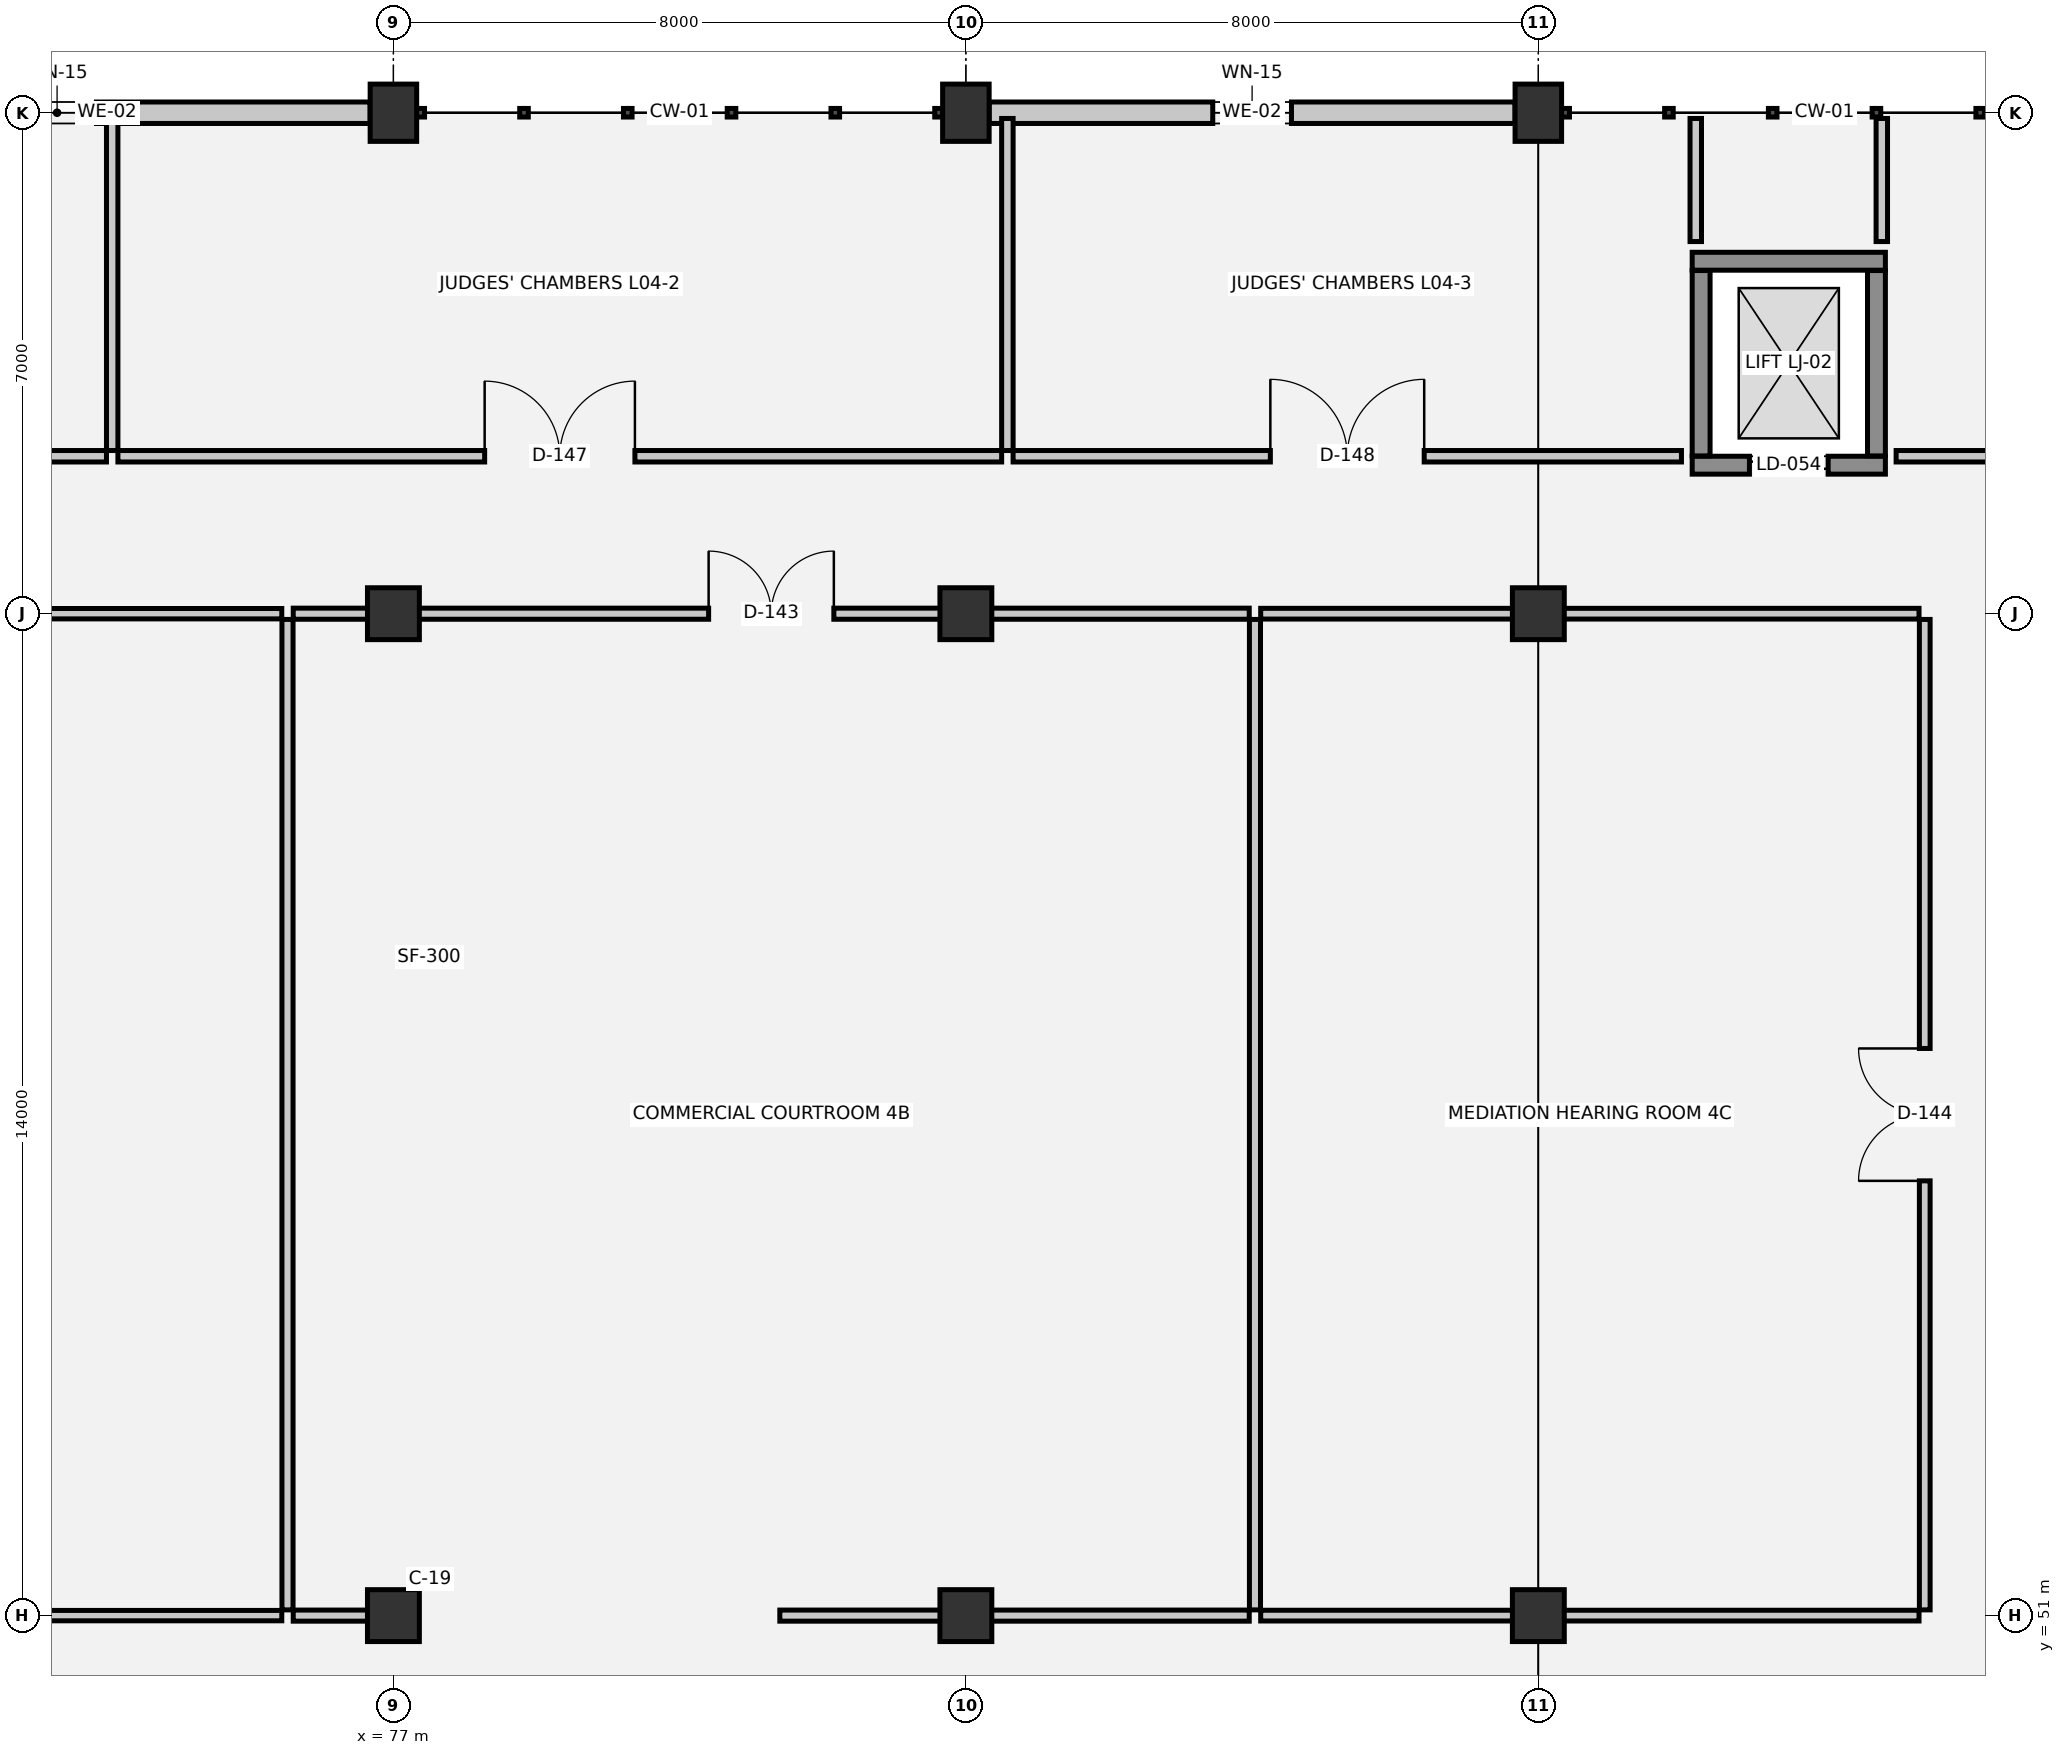
"""IFC4 building model, lengths in metres.
Left out: names, types, materials, properties, quantities, classifications, styles, units other than length and angle.
Written with IfcOpenShell. Run it as: python <this file> out.ifc"""

import sys

from ifc_helpers import new_model, si_unit, direction, frame, frame_2d, origin, origin_2d, place, context, subcontext, project, spatial, rectangle, extrude, element, fill, save


model = new_model("IFC4")
c1 = context("Model", 3, precision=1e-05, world=origin(), true_north=direction((0.0, 1.0)))
c2 = subcontext(c1, "Body", "Model", "MODEL_VIEW")
j1 = project(units=[si_unit("LENGTHUNIT", "METRE"), si_unit("PLANEANGLEUNIT", "RADIAN")], contexts=[c1])
p1 = place(None, origin())
s1 = spatial("IfcSite", under=j1, at=p1, CompositionType="ELEMENT")
p2 = place(p1, origin())
s2 = spatial("IfcBuilding", under=s1, at=p2, CompositionType="ELEMENT")
p3 = place(p2, frame((0.0, 0.0, 14.4)))
s3 = spatial("IfcBuildingStorey", under=s2, at=p3, CompositionType="ELEMENT", Elevation=14.4)
for number, where, z_axis, x_axis in (
    (1, (77.0, 51.0, 0.0), (0.0, 0.0, 1.0), (1.0, 0.0, 0.0)),
    (2, (77.0, 65.0, 0.0), (0.0, 0.0, 1.0), (1.0, 0.0, 0.0)),
):
    element("IfcColumn", number, at=place(p3, frame(where, z_axis=z_axis, x_axis=x_axis)), inside=s3, PredefinedType="COLUMN", context=c2, shape_type="SweptSolid", body=[
        extrude(rectangle(XDim=0.725, YDim=0.725, at=origin_2d()), origin(), (0.0, 0.0, 1.0), 3.9),
    ])
p4 = place(p3, frame((77.0, 72.0, 0.0), z_axis=(0.0, 0.0, 1.0), x_axis=(1.0, 0.0, 0.0)))
e3 = element("IfcColumn", 3, at=p4, inside=s3, PredefinedType="COLUMN", context=c2, shape_type="SweptSolid", body=[
    extrude(rectangle(XDim=0.65, YDim=0.8, at=origin_2d()), origin(), (0.0, 0.0, 1.0), 3.9),
])
for number, where, z_axis, x_axis in (
    (4, (85.0, 51.0, 0.0), (0.0, 0.0, 1.0), (1.0, 0.0, 0.0)),
    (5, (85.0, 65.0, 0.0), (0.0, 0.0, 1.0), (1.0, 0.0, 0.0)),
):
    element("IfcColumn", number, at=place(p3, frame(where, z_axis=z_axis, x_axis=x_axis)), inside=s3, PredefinedType="COLUMN", context=c2, shape_type="SweptSolid", body=[
        extrude(rectangle(XDim=0.725, YDim=0.725, at=origin_2d()), origin(), (0.0, 0.0, 1.0), 3.9),
    ])
p5 = place(p3, frame((85.0, 72.0, 0.0), z_axis=(0.0, 0.0, 1.0), x_axis=(1.0, 0.0, 0.0)))
e6 = element("IfcColumn", 6, at=p5, inside=s3, PredefinedType="COLUMN", context=c2, shape_type="SweptSolid", body=[
    extrude(rectangle(XDim=0.65, YDim=0.8, at=origin_2d()), origin(), (0.0, 0.0, 1.0), 3.9),
])
for number, where, z_axis, x_axis in (
    (7, (93.0, 51.0, 0.0), (0.0, 0.0, 1.0), (1.0, 0.0, 0.0)),
    (8, (93.0, 65.0, 0.0), (0.0, 0.0, 1.0), (1.0, 0.0, 0.0)),
):
    element("IfcColumn", number, at=place(p3, frame(where, z_axis=z_axis, x_axis=x_axis)), inside=s3, PredefinedType="COLUMN", context=c2, shape_type="SweptSolid", body=[
        extrude(rectangle(XDim=0.725, YDim=0.725, at=origin_2d()), origin(), (0.0, 0.0, 1.0), 3.9),
    ])
p6 = place(p3, frame((93.0, 72.0, 0.0), z_axis=(0.0, 0.0, 1.0), x_axis=(1.0, 0.0, 0.0)))
e9 = element("IfcColumn", 9, at=p6, inside=s3, PredefinedType="COLUMN", context=c2, shape_type="SweptSolid", body=[
    extrude(rectangle(XDim=0.65, YDim=0.8, at=origin_2d()), origin(), (0.0, 0.0, 1.0), 3.9),
])
p7 = place(p3, frame((69.325, 72.0, 0.0), z_axis=(0.0, 0.0, 1.0), x_axis=(1.0, 0.0, 0.0)))
e10 = element("IfcWall", 10, at=p7, inside=s3, PredefinedType="SOLIDWALL", context=c2, shape_type="SweptSolid", body=[
    extrude(rectangle(XDim=7.35, YDim=0.3, at=frame_2d((3.675, 0.0))), origin(), (0.0, 0.0, 1.0), 2.61),
])
p8 = place(p7, frame((2.425, 0.0, 1.0)))
e11 = element("IfcOpeningElement", 11, at=p8, cuts=e10, PredefinedType="OPENING", context=c2, shape_type="SweptSolid", body=[
    extrude(rectangle(XDim=1.1, YDim=1.2, at=frame_2d((0.55, 0.6))), frame((0.0, 0.16, 0.0), z_axis=(0.0, -1.0, 0.0), x_axis=(1.0, 0.0, 0.0)), (0.0, 0.0, 1.0), 0.32),
])
p9 = place(p3, frame((85.325, 72.0, 0.0), z_axis=(0.0, 0.0, 1.0), x_axis=(1.0, 0.0, 0.0)))
e12 = element("IfcWall", 12, at=p9, inside=s3, PredefinedType="SOLIDWALL", context=c2, shape_type="SweptSolid", body=[
    extrude(rectangle(XDim=7.35, YDim=0.3, at=frame_2d((3.675, 0.0))), origin(), (0.0, 0.0, 1.0), 2.61),
])
p10 = place(p9, frame((3.125, 0.0, 1.0)))
e13 = element("IfcOpeningElement", 13, at=p10, cuts=e12, PredefinedType="OPENING", context=c2, shape_type="SweptSolid", body=[
    extrude(rectangle(XDim=1.1, YDim=1.2, at=frame_2d((0.55, 0.6))), frame((0.0, 0.16, 0.0), z_axis=(0.0, -1.0, 0.0), x_axis=(1.0, 0.0, 0.0)), (0.0, 0.0, 1.0), 0.32),
])
p11 = place(p3, frame((95.15, 67.075, 0.0), z_axis=(0.0, 0.0, 1.0), x_axis=(1.0, 0.0, 0.0)))
e14 = element("IfcWall", 14, at=p11, inside=s3, PredefinedType="SHEAR", context=c2, shape_type="SweptSolid", body=[
    extrude(rectangle(XDim=2.7, YDim=0.25, at=frame_2d((1.35, 0.0))), origin(), (0.0, 0.0, 1.0), 3.9),
])
p12 = place(p11, frame((0.8, 0.0, 0.0)))
e15 = element("IfcOpeningElement", 15, at=p12, cuts=e14, PredefinedType="OPENING", context=c2, shape_type="SweptSolid", body=[
    extrude(rectangle(XDim=1.1, YDim=2.15, at=frame_2d((0.55, 1.075))), frame((0.0, 0.135, 0.0), z_axis=(0.0, -1.0, 0.0), x_axis=(1.0, 0.0, 0.0)), (0.0, 0.0, 1.0), 0.27),
])
p13 = place(p3, frame((97.85, 69.925, 0.0), z_axis=(0.0, 0.0, 1.0), x_axis=(-1.0, 0.0, 0.0)))
e16 = element("IfcWall", 16, at=p13, inside=s3, PredefinedType="SHEAR", context=c2, shape_type="SweptSolid", body=[
    extrude(rectangle(XDim=2.7, YDim=0.25, at=frame_2d((1.35, 0.0))), origin(), (0.0, 0.0, 1.0), 3.9),
])
for number, where, z_axis, x_axis in (
    (17, (95.275, 69.795, 0.0), (0.0, 0.0, 1.0), (0.0, -1.0, 0.0)),
    (18, (97.725, 67.205, 0.0), (0.0, 0.0, 1.0), (0.0, 1.0, 0.0)),
):
    element("IfcWall", number, at=place(p3, frame(where, z_axis=z_axis, x_axis=x_axis)), inside=s3, PredefinedType="SHEAR", context=c2, shape_type="SweptSolid", body=[
        extrude(rectangle(XDim=2.59, YDim=0.25, at=frame_2d((1.295, 0.0))), origin(), (0.0, 0.0, 1.0), 3.9),
    ])
p14 = place(p3, frame((62.08, 51.0, 0.0), z_axis=(0.0, 0.0, 1.0), x_axis=(1.0, 0.0, 0.0)))
e19 = element("IfcWall", 19, at=p14, inside=s3, PredefinedType="PARTITIONING", context=c2, shape_type="SweptSolid", body=[
    extrude(rectangle(XDim=13.36, YDim=0.145, at=frame_2d((6.68, 0.0))), origin(), (0.0, 0.0, 1.0), 2.93),
])
p15 = place(p14, frame((4.186, 0.0, 0.0)))
e20 = element("IfcOpeningElement", 20, at=p15, cuts=e19, PredefinedType="OPENING", context=c2, shape_type="SweptSolid", body=[
    extrude(rectangle(XDim=1.7, YDim=2.3, at=frame_2d((0.85, 1.15))), frame((0.0, 0.083, 0.0), z_axis=(0.0, -1.0, 0.0), x_axis=(1.0, 0.0, 0.0)), (0.0, 0.0, 1.0), 0.165),
])
p16 = place(p3, frame((75.6, 51.0, 0.0), z_axis=(0.0, 0.0, 1.0), x_axis=(1.0, 0.0, 0.0)))
e21 = element("IfcWall", 21, at=p16, inside=s3, PredefinedType="PARTITIONING", context=c2, shape_type="SweptSolid", body=[
    extrude(rectangle(XDim=1.6, YDim=0.155, at=frame_2d((0.8, 0.0))), origin(), (0.0, 0.0, 1.0), 2.93),
])
p17 = place(p3, frame((82.4, 51.0, 0.0), z_axis=(0.0, 0.0, 1.0), x_axis=(1.0, 0.0, 0.0)))
e22 = element("IfcWall", 22, at=p17, inside=s3, PredefinedType="PARTITIONING", context=c2, shape_type="SweptSolid", body=[
    extrude(rectangle(XDim=6.56, YDim=0.155, at=frame_2d((3.28, 0.0))), origin(), (0.0, 0.0, 1.0), 2.93),
])
p18 = place(p3, frame((89.12, 51.0, 0.0), z_axis=(0.0, 0.0, 1.0), x_axis=(1.0, 0.0, 0.0)))
e23 = element("IfcWall", 23, at=p18, inside=s3, PredefinedType="PARTITIONING", context=c2, shape_type="SweptSolid", body=[
    extrude(rectangle(XDim=9.2, YDim=0.15, at=frame_2d((4.6, 0.0))), origin(), (0.0, 0.0, 1.0), 2.93),
])
p19 = place(p3, frame((62.08, 65.0, 0.0), z_axis=(0.0, 0.0, 1.0), x_axis=(1.0, 0.0, 0.0)))
e24 = element("IfcWall", 24, at=p19, inside=s3, PredefinedType="PARTITIONING", context=c2, shape_type="SweptSolid", body=[
    extrude(rectangle(XDim=13.36, YDim=0.145, at=frame_2d((6.68, 0.0))), origin(), (0.0, 0.0, 1.0), 2.93),
])
p20 = place(p3, frame((75.6, 65.0, 0.0), z_axis=(0.0, 0.0, 1.0), x_axis=(1.0, 0.0, 0.0)))
e25 = element("IfcWall", 25, at=p20, inside=s3, PredefinedType="PARTITIONING", context=c2, shape_type="SweptSolid", body=[
    extrude(rectangle(XDim=13.36, YDim=0.155, at=frame_2d((6.68, 0.0))), origin(), (0.0, 0.0, 1.0), 2.93),
])
p21 = place(p20, frame((5.805, 0.0, 0.0)))
e26 = element("IfcOpeningElement", 26, at=p21, cuts=e25, PredefinedType="OPENING", context=c2, shape_type="SweptSolid", body=[
    extrude(rectangle(XDim=1.75, YDim=2.3, at=frame_2d((0.875, 1.15))), frame((0.0, 0.087, 0.0), z_axis=(0.0, -1.0, 0.0), x_axis=(1.0, 0.0, 0.0)), (0.0, 0.0, 1.0), 0.175),
])
p22 = place(p3, frame((89.12, 65.0, 0.0), z_axis=(0.0, 0.0, 1.0), x_axis=(1.0, 0.0, 0.0)))
e27 = element("IfcWall", 27, at=p22, inside=s3, PredefinedType="PARTITIONING", context=c2, shape_type="SweptSolid", body=[
    extrude(rectangle(XDim=9.2, YDim=0.15, at=frame_2d((4.6, 0.0))), origin(), (0.0, 0.0, 1.0), 2.93),
])
p23 = place(p3, frame((62.08, 67.2, 0.0), z_axis=(0.0, 0.0, 1.0), x_axis=(1.0, 0.0, 0.0)))
e28 = element("IfcWall", 28, at=p23, inside=s3, PredefinedType="PARTITIONING", context=c2, shape_type="SweptSolid", body=[
    extrude(rectangle(XDim=10.91, YDim=0.16, at=frame_2d((5.455, 0.0))), origin(), (0.0, 0.0, 1.0), 3.54),
])
p24 = place(p23, frame((4.43, 0.0, 0.0)))
e29 = element("IfcOpeningElement", 29, at=p24, cuts=e28, PredefinedType="OPENING", context=c2, shape_type="SweptSolid", body=[
    extrude(rectangle(XDim=2.05, YDim=2.35, at=frame_2d((1.025, 1.175))), frame((0.0, 0.09, 0.0), z_axis=(0.0, -1.0, 0.0), x_axis=(1.0, 0.0, 0.0)), (0.0, 0.0, 1.0), 0.18),
])
p25 = place(p3, frame((73.15, 67.2, 0.0), z_axis=(0.0, 0.0, 1.0), x_axis=(1.0, 0.0, 0.0)))
e30 = element("IfcWall", 30, at=p25, inside=s3, PredefinedType="PARTITIONING", context=c2, shape_type="SweptSolid", body=[
    extrude(rectangle(XDim=12.35, YDim=0.16, at=frame_2d((6.175, 0.0))), origin(), (0.0, 0.0, 1.0), 3.54),
])
p26 = place(p25, frame((5.125, 0.0, 0.0)))
e31 = element("IfcOpeningElement", 31, at=p26, cuts=e30, PredefinedType="OPENING", context=c2, shape_type="SweptSolid", body=[
    extrude(rectangle(XDim=2.1, YDim=2.35, at=frame_2d((1.05, 1.175))), frame((0.0, 0.09, 0.0), z_axis=(0.0, -1.0, 0.0), x_axis=(1.0, 0.0, 0.0)), (0.0, 0.0, 1.0), 0.18),
])
p27 = place(p3, frame((85.66, 67.2, 0.0), z_axis=(0.0, 0.0, 1.0), x_axis=(1.0, 0.0, 0.0)))
e32 = element("IfcWall", 32, at=p27, inside=s3, PredefinedType="PARTITIONING", context=c2, shape_type="SweptSolid", body=[
    extrude(rectangle(XDim=9.34, YDim=0.16, at=frame_2d((4.67, 0.0))), origin(), (0.0, 0.0, 1.0), 3.54),
])
p28 = place(p27, frame((3.595, 0.0, 0.0)))
e33 = element("IfcOpeningElement", 33, at=p28, cuts=e32, PredefinedType="OPENING", context=c2, shape_type="SweptSolid", body=[
    extrude(rectangle(XDim=2.15, YDim=2.4, at=frame_2d((1.075, 1.2))), frame((0.0, 0.09, 0.0), z_axis=(0.0, -1.0, 0.0), x_axis=(1.0, 0.0, 0.0)), (0.0, 0.0, 1.0), 0.18),
])
p29 = place(p3, frame((98.0, 67.2, 0.0), z_axis=(0.0, 0.0, 1.0), x_axis=(1.0, 0.0, 0.0)))
e34 = element("IfcWall", 34, at=p29, inside=s3, PredefinedType="PARTITIONING", context=c2, shape_type="SweptSolid", body=[
    extrude(rectangle(XDim=21.72, YDim=0.16, at=frame_2d((10.86, 0.0))), origin(), (0.0, 0.0, 1.0), 3.54),
])
p30 = place(p29, frame((9.735, 0.0, 0.0)))
e35 = element("IfcOpeningElement", 35, at=p30, cuts=e34, PredefinedType="OPENING", context=c2, shape_type="SweptSolid", body=[
    extrude(rectangle(XDim=2.25, YDim=2.4, at=frame_2d((1.125, 1.2))), frame((0.0, 0.09, 0.0), z_axis=(0.0, -1.0, 0.0), x_axis=(1.0, 0.0, 0.0)), (0.0, 0.0, 1.0), 0.18),
])
p31 = place(p3, frame((73.07, 67.28, 0.0), z_axis=(0.0, 0.0, 1.0), x_axis=(0.0, 1.0, 0.0)))
e36 = element("IfcWall", 36, at=p31, inside=s3, PredefinedType="PARTITIONING", context=c2, shape_type="SweptSolid", body=[
    extrude(rectangle(XDim=4.64, YDim=0.16, at=frame_2d((2.32, 0.0))), origin(), (0.0, 0.0, 1.0), 3.54),
])
p32 = place(p3, frame((75.52, 51.08, 0.0), z_axis=(0.0, 0.0, 1.0), x_axis=(0.0, 1.0, 0.0)))
e37 = element("IfcWall", 37, at=p32, inside=s3, PredefinedType="PARTITIONING", context=c2, shape_type="SweptSolid", body=[
    extrude(rectangle(XDim=13.84, YDim=0.155, at=frame_2d((6.92, 0.0))), origin(), (0.0, 0.0, 1.0), 3.54),
])
p33 = place(p3, frame((85.58, 67.28, 0.0), z_axis=(0.0, 0.0, 1.0), x_axis=(0.0, 1.0, 0.0)))
e38 = element("IfcWall", 38, at=p33, inside=s3, PredefinedType="PARTITIONING", context=c2, shape_type="SweptSolid", body=[
    extrude(rectangle(XDim=4.64, YDim=0.16, at=frame_2d((2.32, 0.0))), origin(), (0.0, 0.0, 1.0), 3.54),
])
p34 = place(p3, frame((89.04, 51.08, 0.0), z_axis=(0.0, 0.0, 1.0), x_axis=(0.0, 1.0, 0.0)))
e39 = element("IfcWall", 39, at=p34, inside=s3, PredefinedType="PARTITIONING", context=c2, shape_type="SweptSolid", body=[
    extrude(rectangle(XDim=13.84, YDim=0.155, at=frame_2d((6.92, 0.0))), origin(), (0.0, 0.0, 1.0), 3.54),
])
for number, where, z_axis, x_axis in (
    (40, (95.2, 70.2, 0.0), (0.0, 0.0, 1.0), (0.0, 1.0, 0.0)),
    (41, (97.8, 70.2, 0.0), (0.0, 0.0, 1.0), (0.0, 1.0, 0.0)),
):
    element("IfcWall", number, at=place(p3, frame(where, z_axis=z_axis, x_axis=x_axis)), inside=s3, PredefinedType="PARTITIONING", context=c2, shape_type="SweptSolid", body=[
        extrude(rectangle(XDim=1.72, YDim=0.16, at=frame_2d((0.86, 0.0))), origin(), (0.0, 0.0, 1.0), 3.54),
    ])
p35 = place(p3, frame((98.4, 51.08, 0.0), z_axis=(0.0, 0.0, 1.0), x_axis=(0.0, 1.0, 0.0)))
e42 = element("IfcWall", 42, at=p35, inside=s3, PredefinedType="PARTITIONING", context=c2, shape_type="SweptSolid", body=[
    extrude(rectangle(XDim=13.84, YDim=0.15, at=frame_2d((6.92, 0.0))), origin(), (0.0, 0.0, 1.0), 3.54),
])
p36 = place(p35, frame((5.995, 0.0, 0.0)))
e43 = element("IfcOpeningElement", 43, at=p36, cuts=e42, PredefinedType="OPENING", context=c2, shape_type="SweptSolid", body=[
    extrude(rectangle(XDim=1.85, YDim=2.3, at=frame_2d((0.925, 1.15))), frame((0.0, 0.085, 0.0), z_axis=(0.0, -1.0, 0.0), x_axis=(1.0, 0.0, 0.0)), (0.0, 0.0, 1.0), 0.17),
])
p37 = place(p8, origin())
e44 = element("IfcWindow", 44, at=p37, inside=s3, PartitioningType="SINGLE_PANEL", PredefinedType="WINDOW", context=c2, shape_type="SweptSolid", body=[
    extrude(rectangle(XDim=1.1, YDim=1.2, at=frame_2d((0.55, 0.6))), frame((0.0, 0.03, 0.0), z_axis=(0.0, -1.0, 0.0), x_axis=(1.0, 0.0, 0.0)), (0.0, 0.0, 1.0), 0.06),
])
fill(e11, e44)
p38 = place(p10, origin())
e45 = element("IfcWindow", 45, at=p38, inside=s3, PartitioningType="SINGLE_PANEL", PredefinedType="WINDOW", context=c2, shape_type="SweptSolid", body=[
    extrude(rectangle(XDim=1.1, YDim=1.2, at=frame_2d((0.55, 0.6))), frame((0.0, 0.03, 0.0), z_axis=(0.0, -1.0, 0.0), x_axis=(1.0, 0.0, 0.0)), (0.0, 0.0, 1.0), 0.06),
])
fill(e13, e45)
p39 = place(p12, origin())
e46 = element("IfcDoor", 46, at=p39, inside=s3, OperationType="DOUBLE_DOOR_SLIDING", PredefinedType="DOOR", context=c2, shape_type="SweptSolid", body=[
    extrude(rectangle(XDim=1.1, YDim=2.15, at=frame_2d((0.55, 1.075))), frame((0.0, 0.025, 0.0), z_axis=(0.0, -1.0, 0.0), x_axis=(1.0, 0.0, 0.0)), (0.0, 0.0, 1.0), 0.05),
])
fill(e15, e46)
p40 = place(p21, origin())
e47 = element("IfcDoor", 47, at=p40, inside=s3, OperationType="DOUBLE_DOOR_SINGLE_SWING", PredefinedType="DOOR", context=c2, shape_type="SweptSolid", body=[
    extrude(rectangle(XDim=1.75, YDim=2.3, at=frame_2d((0.875, 1.15))), frame((0.0, 0.025, 0.0), z_axis=(0.0, -1.0, 0.0), x_axis=(1.0, 0.0, 0.0)), (0.0, 0.0, 1.0), 0.05),
])
fill(e26, e47)
p41 = place(p36, origin())
e48 = element("IfcDoor", 48, at=p41, inside=s3, OperationType="DOUBLE_DOOR_SINGLE_SWING", PredefinedType="DOOR", context=c2, shape_type="SweptSolid", body=[
    extrude(rectangle(XDim=1.85, YDim=2.3, at=frame_2d((0.925, 1.15))), frame((0.0, 0.025, 0.0), z_axis=(0.0, -1.0, 0.0), x_axis=(1.0, 0.0, 0.0)), (0.0, 0.0, 1.0), 0.05),
])
fill(e43, e48)
p42 = place(p26, origin())
e49 = element("IfcDoor", 49, at=p42, inside=s3, OperationType="DOUBLE_DOOR_SINGLE_SWING", PredefinedType="DOOR", context=c2, shape_type="SweptSolid", body=[
    extrude(rectangle(XDim=2.1, YDim=2.35, at=frame_2d((1.05, 1.175))), frame((0.0, 0.025, 0.0), z_axis=(0.0, -1.0, 0.0), x_axis=(1.0, 0.0, 0.0)), (0.0, 0.0, 1.0), 0.05),
])
fill(e31, e49)
p43 = place(p28, origin())
e50 = element("IfcDoor", 50, at=p43, inside=s3, OperationType="DOUBLE_DOOR_SINGLE_SWING", PredefinedType="DOOR", context=c2, shape_type="SweptSolid", body=[
    extrude(rectangle(XDim=2.15, YDim=2.4, at=frame_2d((1.075, 1.2))), frame((0.0, 0.025, 0.0), z_axis=(0.0, -1.0, 0.0), x_axis=(1.0, 0.0, 0.0)), (0.0, 0.0, 1.0), 0.05),
])
fill(e33, e50)
save(model, sys.argv[1])
